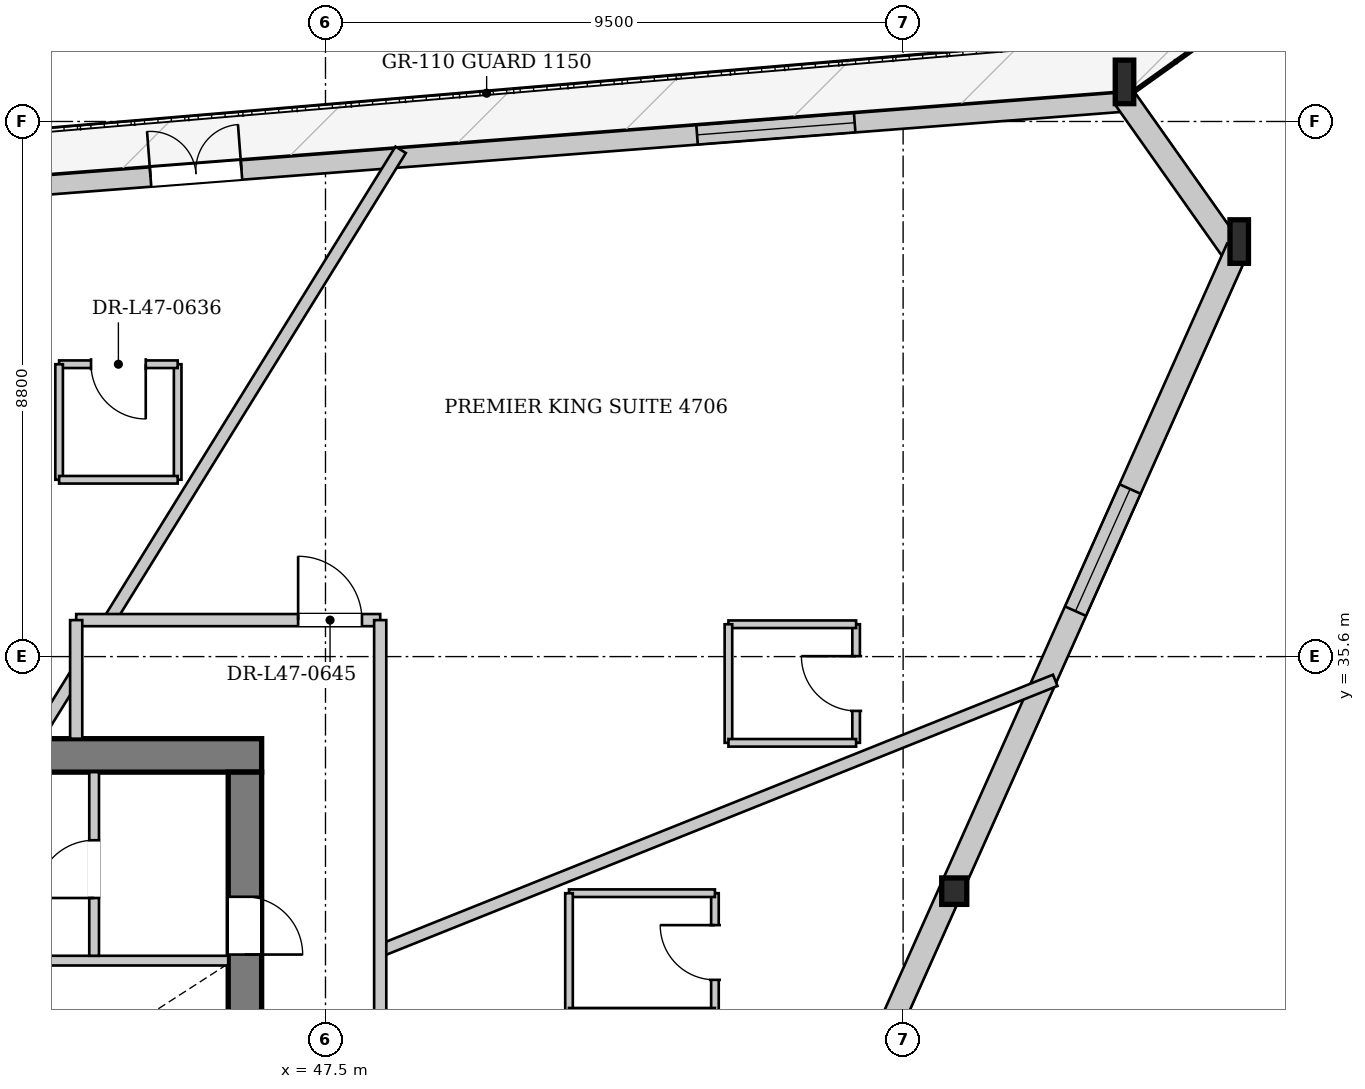
"""IFC4 building model, lengths in metres.
Left out: names, types, materials, properties, quantities, classifications, styles, units other than length and angle.
Written with IfcOpenShell. Run it as: python <this file> out.ifc"""

import sys

from ifc_helpers import new_model, si_unit, direction, frame, frame_2d, origin, origin_2d, place, context, subcontext, project, spatial, rectangle, i_section, extrude, source, transform, mapped, element, fill, save


model = new_model("IFC4")
c1 = context("Model", 3, precision=1e-05, world=origin(), true_north=direction((0.0, 1.0)))
c2 = subcontext(c1, "Body", "Model", "MODEL_VIEW")
j1 = project(units=[si_unit("LENGTHUNIT", "METRE"), si_unit("PLANEANGLEUNIT", "RADIAN")], contexts=[c1])
p1 = place(None, origin())
s1 = spatial("IfcSite", under=j1, at=p1, CompositionType="ELEMENT")
p2 = place(p1, origin())
s2 = spatial("IfcBuilding", under=s1, at=p2, CompositionType="ELEMENT")
p3 = place(p2, frame((0.0, 0.0, 178.55)))
s3 = spatial("IfcBuildingStorey", under=s2, at=p3, CompositionType="ELEMENT", Elevation=178.55)
m1 = source(origin(), c2, "Body", "SweptSolid", [
    extrude(i_section(OverallWidth=0.304, OverallDepth=0.716, WebThickness=0.021, FlangeThickness=0.04, at=origin_2d()), origin(), (0.0, 0.0, 1.0), 3.418),
])
p4 = place(p3, frame((62.675, 42.238, 0.0), z_axis=(-0.086416341516, 0.109555923872, 0.990217004229), x_axis=(-0.785144723535, -0.61931233082, 0.0)))
e1 = element("IfcColumn", 1, at=p4, inside=s3, PredefinedType="COLUMN", context=c2, shape_type="MappedRepresentation", body=[
    mapped(m1, transform((0.0, 0.0, 0.0), x_axis=(1.0, 0.0, 0.0), y_axis=(0.0, 1.0, 0.0), z_axis=(0.0, 0.0, 1.0), scale=1.0)),
])
m2 = source(origin(), c2, "Body", "SweptSolid", [
    extrude(i_section(OverallWidth=0.304, OverallDepth=0.716, WebThickness=0.021, FlangeThickness=0.04, at=origin_2d()), origin(), (0.0, 0.0, 1.0), 3.414),
])
p5 = place(p3, frame((60.798, 44.894, 0.0), z_axis=(-0.09210556719, 0.091962546123, 0.991493547434), x_axis=(-0.706557145383, -0.707655990088, 0.0)))
e2 = element("IfcColumn", 2, at=p5, inside=s3, PredefinedType="COLUMN", context=c2, shape_type="MappedRepresentation", body=[
    mapped(m2, transform((0.0, 0.0, 0.0), x_axis=(1.0, 0.0, 0.0), y_axis=(0.0, 1.0, 0.0), z_axis=(0.0, 0.0, 1.0), scale=1.0)),
])
m3 = source(origin(), c2, "Body", "SweptSolid", [
    extrude(i_section(OverallWidth=0.412, OverallDepth=0.435, WebThickness=0.031, FlangeThickness=0.05, at=origin_2d()), origin(), (0.0, 0.0, 1.0), 3.404),
])
p6 = place(p3, frame((57.912, 31.58, 0.0), z_axis=(-0.042034391169, 0.095402287123, 0.994550910497), x_axis=(-0.915112004841, -0.403199725441, 0.0)))
e3 = element("IfcColumn", 3, at=p6, inside=s3, PredefinedType="COLUMN", context=c2, shape_type="MappedRepresentation", body=[
    mapped(m3, transform((0.0, 0.0, 0.0), x_axis=(1.0, 0.0, 0.0), y_axis=(0.0, 1.0, 0.0), z_axis=(0.0, 0.0, 1.0), scale=1.0)),
])
p7 = place(p3, frame((38.104, 42.985, 0.0), z_axis=(0.0, 0.0, 1.0), x_axis=(0.997043186839, 0.076843240291, 0.0)))
e4 = element("IfcWall", 4, at=p7, inside=s3, PredefinedType="SOLIDWALL", context=c2, shape_type="SweptSolid", body=[
    extrude(rectangle(XDim=22.774, YDim=0.32, at=frame_2d((11.387, 0.0))), origin(), (0.0, 0.0, 1.0), 2.722),
])
p8 = place(p7, frame((6.538, 0.0, 0.0)))
e5 = element("IfcOpeningElement", 5, at=p8, cuts=e4, PredefinedType="OPENING", context=c2, shape_type="SweptSolid", body=[
    extrude(rectangle(XDim=1.5, YDim=2.3, at=frame_2d((0.75, 1.15))), frame((0.0, 0.17, 0.0), z_axis=(0.0, -1.0, 0.0), x_axis=(1.0, 0.0, 0.0)), (0.0, 0.0, 1.0), 0.34),
])
p9 = place(p7, frame((15.553, 0.0, 0.252)))
e6 = element("IfcOpeningElement", 6, at=p9, cuts=e4, PredefinedType="OPENING", context=c2, shape_type="SweptSolid", body=[
    extrude(rectangle(XDim=2.6, YDim=2.35, at=frame_2d((1.3, 1.175))), frame((0.0, 0.17, 0.0), z_axis=(0.0, -1.0, 0.0), x_axis=(1.0, 0.0, 0.0)), (0.0, 0.0, 1.0), 0.34),
])
p10 = place(p3, frame((60.643, 44.784, 0.0), z_axis=(0.0, 0.0, 1.0), x_axis=(0.577204748186, -0.816599460367, 0.0)))
e7 = element("IfcWall", 7, at=p10, inside=s3, PredefinedType="SOLIDWALL", context=c2, shape_type="SweptSolid", body=[
    extrude(rectangle(XDim=3.252, YDim=0.38, at=frame_2d((1.626, 0.0))), origin(), (0.0, 0.0, 1.0), 2.722),
])
p11 = place(p3, frame((62.502, 42.315, 0.0), z_axis=(0.0, 0.0, 1.0), x_axis=(-0.408010166112, -0.912977384358, 0.0)))
e8 = element("IfcWall", 8, at=p11, inside=s3, PredefinedType="SOLIDWALL", context=c2, shape_type="SweptSolid", body=[
    extrude(rectangle(XDim=23.347, YDim=0.38, at=frame_2d((11.674, 0.0))), origin(), (0.0, 0.0, 1.0), 2.722),
])
p12 = place(p11, frame((4.337, 0.0, 0.352)))
e9 = element("IfcOpeningElement", 9, at=p12, cuts=e8, PredefinedType="OPENING", context=c2, shape_type="SweptSolid", body=[
    extrude(rectangle(XDim=2.2, YDim=2.25, at=frame_2d((1.1, 1.125))), frame((0.0, 0.2, 0.0), z_axis=(0.0, -1.0, 0.0), x_axis=(1.0, 0.0, 0.0)), (0.0, 0.0, 1.0), 0.4),
])
p13 = place(p11, frame((15.71, 0.0, 0.352)))
e10 = element("IfcOpeningElement", 10, at=p13, cuts=e8, PredefinedType="OPENING", context=c2, shape_type="SweptSolid", body=[
    extrude(rectangle(XDim=2.2, YDim=2.25, at=frame_2d((1.1, 1.125))), frame((0.0, 0.2, 0.0), z_axis=(0.0, -1.0, 0.0), x_axis=(1.0, 0.0, 0.0)), (0.0, 0.0, 1.0), 0.4),
])
p14 = place(p3, frame((29.55, 33.975, 0.0), z_axis=(0.0, 0.0, 1.0), x_axis=(1.0, 0.0, 0.0)))
e11 = element("IfcWall", 11, at=p14, inside=s3, PredefinedType="SHEAR", context=c2, shape_type="SweptSolid", body=[
    extrude(rectangle(XDim=16.9, YDim=0.55, at=frame_2d((8.45, 0.0))), origin(), (0.0, 0.0, 1.0), 3.33),
])
p15 = place(p14, frame((1.55, 0.0, 0.0)))
e12 = element("IfcOpeningElement", 12, at=p15, cuts=e11, PredefinedType="OPENING", context=c2, shape_type="SweptSolid", body=[
    extrude(rectangle(XDim=0.95, YDim=2.1, at=frame_2d((0.475, 1.05))), frame((0.0, 0.285, 0.0), z_axis=(0.0, -1.0, 0.0), x_axis=(1.0, 0.0, 0.0)), (0.0, 0.0, 1.0), 0.57),
])
p16 = place(p14, frame((3.93, 0.0, 0.0)))
e13 = element("IfcOpeningElement", 13, at=p16, cuts=e11, PredefinedType="OPENING", context=c2, shape_type="SweptSolid", body=[
    extrude(rectangle(XDim=1.32, YDim=2.2, at=frame_2d((0.66, 1.1))), frame((0.0, 0.285, 0.0), z_axis=(0.0, -1.0, 0.0), x_axis=(1.0, 0.0, 0.0)), (0.0, 0.0, 1.0), 0.57),
])
p17 = place(p3, frame((46.175, 33.7, 0.0), z_axis=(0.0, 0.0, 1.0), x_axis=(0.0, -1.0, 0.0)))
e14 = element("IfcWall", 14, at=p17, inside=s3, PredefinedType="SHEAR", context=c2, shape_type="SweptSolid", body=[
    extrude(rectangle(XDim=14.2, YDim=0.55, at=frame_2d((7.1, 0.0))), origin(), (0.0, 0.0, 1.0), 3.33),
])
p18 = place(p17, frame((5.18, 0.0, 0.0)))
e15 = element("IfcOpeningElement", 15, at=p18, cuts=e14, PredefinedType="OPENING", context=c2, shape_type="SweptSolid", body=[
    extrude(rectangle(XDim=1.6, YDim=2.2, at=frame_2d((0.8, 1.1))), frame((0.0, 0.285, 0.0), z_axis=(0.0, -1.0, 0.0), x_axis=(1.0, 0.0, 0.0)), (0.0, 0.0, 1.0), 0.57),
])
p19 = place(p17, frame((2.05, 0.0, 0.0)))
e16 = element("IfcOpeningElement", 16, at=p19, cuts=e14, PredefinedType="OPENING", context=c2, shape_type="SweptSolid", body=[
    extrude(rectangle(XDim=0.95, YDim=2.1, at=frame_2d((0.475, 1.05))), frame((0.0, 0.285, 0.0), z_axis=(0.0, -1.0, 0.0), x_axis=(1.0, 0.0, 0.0)), (0.0, 0.0, 1.0), 0.57),
])
p20 = place(p3, frame((40.72, 30.6, 0.0), z_axis=(0.0, 0.0, 1.0), x_axis=(1.0, 0.0, 0.0)))
e17 = element("IfcWall", 17, at=p20, inside=s3, PredefinedType="PARTITIONING", context=c2, shape_type="SweptSolid", body=[
    extrude(rectangle(XDim=5.18, YDim=0.16, at=frame_2d((2.59, 0.0))), origin(), (0.0, 0.0, 1.0), 3.33),
])
p21 = place(p3, frame((43.695, 30.68, 0.0), z_axis=(0.0, 0.0, 1.0), x_axis=(0.0, 1.0, 0.0)))
e18 = element("IfcWall", 18, at=p21, inside=s3, PredefinedType="PARTITIONING", context=c2, shape_type="SweptSolid", body=[
    extrude(rectangle(XDim=3.02, YDim=0.16, at=frame_2d((1.51, 0.0))), origin(), (0.0, 0.0, 1.0), 3.33),
])
p22 = place(p21, frame((0.95, 0.0, 0.0)))
e19 = element("IfcOpeningElement", 19, at=p22, cuts=e18, PredefinedType="OPENING", context=c2, shape_type="SweptSolid", body=[
    extrude(rectangle(XDim=0.95, YDim=2.1, at=frame_2d((0.475, 1.05))), frame((0.0, 0.09, 0.0), z_axis=(0.0, -1.0, 0.0), x_axis=(1.0, 0.0, 0.0)), (0.0, 0.0, 1.0), 0.18),
])
p23 = place(p3, frame((48.4, 30.764, 0.0), z_axis=(0.0, 0.0, 1.0), x_axis=(0.928341463562, 0.371728566338, 0.0)))
e20 = element("IfcWall", 20, at=p23, inside=s3, PredefinedType="PARTITIONING", context=c2, shape_type="SweptSolid", body=[
    extrude(rectangle(XDim=11.958, YDim=0.2, at=frame_2d((5.979, 0.0))), origin(), (0.0, 0.0, 1.0), 3.33),
])
p24 = place(p3, frame((42.738, 34.25, 0.0), z_axis=(0.0, 0.0, 1.0), x_axis=(0.526414798645, 0.850227886962, 0.0)))
e21 = element("IfcWall", 21, at=p24, inside=s3, PredefinedType="PARTITIONING", context=c2, shape_type="SweptSolid", body=[
    extrude(rectangle(XDim=1.257, YDim=0.2, at=frame_2d((0.628, 0.0))), origin(), (0.0, 0.0, 1.0), 3.33),
])
p25 = place(p3, frame((43.946, 36.2, 0.0), z_axis=(0.0, 0.0, 1.0), x_axis=(0.526559690384, 0.850138160808, 0.0)))
e22 = element("IfcWall", 22, at=p25, inside=s3, PredefinedType="PARTITIONING", context=c2, shape_type="SweptSolid", body=[
    extrude(rectangle(XDim=9.098, YDim=0.2, at=frame_2d((4.549, 0.0))), origin(), (0.0, 0.0, 1.0), 3.33),
])
p26 = place(p3, frame((53.905, 29.759, 0.0), z_axis=(0.0, 0.0, 1.0), x_axis=(0.0, 1.0, 0.0)))
e23 = element("IfcWall", 23, at=p26, inside=s3, PredefinedType="PARTITIONING", context=c2, shape_type="SweptSolid", body=[
    extrude(rectangle(XDim=1.95, YDim=0.125, at=frame_2d((0.975, 0.0))), origin(), (0.0, 0.0, 1.0), 3.33),
])
p27 = place(p26, frame((0.525, 0.0, 0.0)))
e24 = element("IfcOpeningElement", 24, at=p27, cuts=e23, PredefinedType="OPENING", context=c2, shape_type="SweptSolid", body=[
    extrude(rectangle(XDim=0.9, YDim=2.1, at=frame_2d((0.45, 1.05))), frame((0.0, 0.073, 0.0), z_axis=(0.0, -1.0, 0.0), x_axis=(1.0, 0.0, 0.0)), (0.0, 0.0, 1.0), 0.145),
])
p28 = place(p3, frame((53.905, 31.709, 0.0), z_axis=(0.0, 0.0, 1.0), x_axis=(-1.0, 0.0, 0.0)))
e25 = element("IfcWall", 25, at=p28, inside=s3, PredefinedType="PARTITIONING", context=c2, shape_type="SweptSolid", body=[
    extrude(rectangle(XDim=2.4, YDim=0.125, at=frame_2d((1.2, 0.0))), origin(), (0.0, 0.0, 1.0), 3.33),
])
p29 = place(p3, frame((51.505, 31.709, 0.0), z_axis=(0.0, 0.0, 1.0), x_axis=(0.0, -1.0, 0.0)))
e26 = element("IfcWall", 26, at=p29, inside=s3, PredefinedType="PARTITIONING", context=c2, shape_type="SweptSolid", body=[
    extrude(rectangle(XDim=1.95, YDim=0.125, at=frame_2d((0.975, 0.0))), origin(), (0.0, 0.0, 1.0), 3.33),
])
p30 = place(p3, frame((51.505, 29.759, 0.0), z_axis=(0.0, 0.0, 1.0), x_axis=(1.0, 0.0, 0.0)))
e27 = element("IfcWall", 27, at=p30, inside=s3, PredefinedType="PARTITIONING", context=c2, shape_type="SweptSolid", body=[
    extrude(rectangle(XDim=2.4, YDim=0.125, at=frame_2d((1.2, 0.0))), origin(), (0.0, 0.0, 1.0), 3.33),
])
p31 = place(p3, frame((56.227, 34.182, 0.0), z_axis=(0.0, 0.0, 1.0), x_axis=(0.0, 1.0, 0.0)))
e28 = element("IfcWall", 28, at=p31, inside=s3, PredefinedType="PARTITIONING", context=c2, shape_type="SweptSolid", body=[
    extrude(rectangle(XDim=1.95, YDim=0.125, at=frame_2d((0.975, 0.0))), origin(), (0.0, 0.0, 1.0), 3.33),
])
p32 = place(p31, frame((0.525, 0.0, 0.0)))
e29 = element("IfcOpeningElement", 29, at=p32, cuts=e28, PredefinedType="OPENING", context=c2, shape_type="SweptSolid", body=[
    extrude(rectangle(XDim=0.9, YDim=2.1, at=frame_2d((0.45, 1.05))), frame((0.0, 0.073, 0.0), z_axis=(0.0, -1.0, 0.0), x_axis=(1.0, 0.0, 0.0)), (0.0, 0.0, 1.0), 0.145),
])
p33 = place(p3, frame((56.227, 36.132, 0.0), z_axis=(0.0, 0.0, 1.0), x_axis=(-1.0, 0.0, 0.0)))
e30 = element("IfcWall", 30, at=p33, inside=s3, PredefinedType="PARTITIONING", context=c2, shape_type="SweptSolid", body=[
    extrude(rectangle(XDim=2.1, YDim=0.125, at=frame_2d((1.05, 0.0))), origin(), (0.0, 0.0, 1.0), 3.33),
])
p34 = place(p3, frame((54.127, 36.132, 0.0), z_axis=(0.0, 0.0, 1.0), x_axis=(0.0, -1.0, 0.0)))
e31 = element("IfcWall", 31, at=p34, inside=s3, PredefinedType="PARTITIONING", context=c2, shape_type="SweptSolid", body=[
    extrude(rectangle(XDim=1.95, YDim=0.125, at=frame_2d((0.975, 0.0))), origin(), (0.0, 0.0, 1.0), 3.33),
])
p35 = place(p3, frame((54.127, 34.182, 0.0), z_axis=(0.0, 0.0, 1.0), x_axis=(1.0, 0.0, 0.0)))
e32 = element("IfcWall", 32, at=p35, inside=s3, PredefinedType="PARTITIONING", context=c2, shape_type="SweptSolid", body=[
    extrude(rectangle(XDim=2.1, YDim=0.125, at=frame_2d((1.05, 0.0))), origin(), (0.0, 0.0, 1.0), 3.33),
])
p36 = place(p3, frame((45.069, 38.508, 0.0), z_axis=(0.0, 0.0, 1.0), x_axis=(0.0, 1.0, 0.0)))
e33 = element("IfcWall", 33, at=p36, inside=s3, PredefinedType="PARTITIONING", context=c2, shape_type="SweptSolid", body=[
    extrude(rectangle(XDim=1.9, YDim=0.125, at=frame_2d((0.95, 0.0))), origin(), (0.0, 0.0, 1.0), 3.33),
])
p37 = place(p3, frame((45.069, 40.408, 0.0), z_axis=(0.0, 0.0, 1.0), x_axis=(-1.0, 0.0, 0.0)))
e34 = element("IfcWall", 34, at=p37, inside=s3, PredefinedType="PARTITIONING", context=c2, shape_type="SweptSolid", body=[
    extrude(rectangle(XDim=1.95, YDim=0.125, at=frame_2d((0.975, 0.0))), origin(), (0.0, 0.0, 1.0), 3.33),
])
p38 = place(p37, frame((0.525, 0.0, 0.0)))
e35 = element("IfcOpeningElement", 35, at=p38, cuts=e34, PredefinedType="OPENING", context=c2, shape_type="SweptSolid", body=[
    extrude(rectangle(XDim=0.9, YDim=2.1, at=frame_2d((0.45, 1.05))), frame((0.0, 0.073, 0.0), z_axis=(0.0, -1.0, 0.0), x_axis=(1.0, 0.0, 0.0)), (0.0, 0.0, 1.0), 0.145),
])
p39 = place(p3, frame((43.119, 40.408, 0.0), z_axis=(0.0, 0.0, 1.0), x_axis=(0.0, -1.0, 0.0)))
e36 = element("IfcWall", 36, at=p39, inside=s3, PredefinedType="PARTITIONING", context=c2, shape_type="SweptSolid", body=[
    extrude(rectangle(XDim=1.9, YDim=0.125, at=frame_2d((0.95, 0.0))), origin(), (0.0, 0.0, 1.0), 3.33),
])
p40 = place(p3, frame((43.119, 38.508, 0.0), z_axis=(0.0, 0.0, 1.0), x_axis=(1.0, 0.0, 0.0)))
e37 = element("IfcWall", 37, at=p40, inside=s3, PredefinedType="PARTITIONING", context=c2, shape_type="SweptSolid", body=[
    extrude(rectangle(XDim=1.95, YDim=0.125, at=frame_2d((0.975, 0.0))), origin(), (0.0, 0.0, 1.0), 3.33),
])
p41 = place(p3, frame((43.4, 36.2, 0.0), z_axis=(0.0, 0.0, 1.0), x_axis=(1.0, 0.0, 0.0)))
e38 = element("IfcWall", 38, at=p41, inside=s3, PredefinedType="PARTITIONING", context=c2, shape_type="SweptSolid", body=[
    extrude(rectangle(XDim=5.0, YDim=0.2, at=frame_2d((2.5, 0.0))), origin(), (0.0, 0.0, 1.0), 3.33),
])
p42 = place(p41, frame((3.65, 0.0, 0.0)))
e39 = element("IfcOpeningElement", 39, at=p42, cuts=e38, PredefinedType="OPENING", context=c2, shape_type="SweptSolid", body=[
    extrude(rectangle(XDim=1.05, YDim=2.2, at=frame_2d((0.525, 1.1))), frame((0.0, 0.11, 0.0), z_axis=(0.0, -1.0, 0.0), x_axis=(1.0, 0.0, 0.0)), (0.0, 0.0, 1.0), 0.22),
])
p43 = place(p3, frame((43.4, 34.25, 0.0), z_axis=(0.0, 0.0, 1.0), x_axis=(0.0, 1.0, 0.0)))
e40 = element("IfcWall", 40, at=p43, inside=s3, PredefinedType="PARTITIONING", context=c2, shape_type="SweptSolid", body=[
    extrude(rectangle(XDim=1.95, YDim=0.2, at=frame_2d((0.975, 0.0))), origin(), (0.0, 0.0, 1.0), 3.33),
])
p44 = place(p3, frame((48.4, 17.0, 0.0), z_axis=(0.0, 0.0, 1.0), x_axis=(0.0, 1.0, 0.0)))
e41 = element("IfcWall", 41, at=p44, inside=s3, PredefinedType="PARTITIONING", context=c2, shape_type="SweptSolid", body=[
    extrude(rectangle(XDim=19.2, YDim=0.2, at=frame_2d((9.6, 0.0))), origin(), (0.0, 0.0, 1.0), 3.33),
])
p45 = place(p44, frame((9.249, 0.0, 0.0)))
e42 = element("IfcOpeningElement", 42, at=p45, cuts=e41, PredefinedType="OPENING", context=c2, shape_type="SweptSolid", body=[
    extrude(rectangle(XDim=1.05, YDim=2.2, at=frame_2d((0.525, 1.1))), frame((0.0, 0.11, 0.0), z_axis=(0.0, -1.0, 0.0), x_axis=(1.0, 0.0, 0.0)), (0.0, 0.0, 1.0), 0.22),
])
m4 = source(origin(), c2, "Body", "SweptSolid", [
    extrude(rectangle(XDim=1.5, YDim=2.3, at=frame_2d((0.75, 1.15))), frame((0.0, 0.025, 0.0), z_axis=(0.0, -1.0, 0.0), x_axis=(1.0, 0.0, 0.0)), (0.0, 0.0, 1.0), 0.05),
])
p46 = place(p8, origin())
e43 = element("IfcDoor", 43, at=p46, inside=s3, OperationType="DOUBLE_DOOR_SINGLE_SWING", PredefinedType="DOOR", context=c2, shape_type="MappedRepresentation", body=[
    mapped(m4, transform((0.0, 0.0, 0.0), x_axis=(1.0, 0.0, 0.0), y_axis=(0.0, 1.0, 0.0), z_axis=(0.0, 0.0, 1.0), scale=1.0)),
])
fill(e5, e43)
m5 = source(origin(), c2, "Body", "SweptSolid", [
    extrude(rectangle(XDim=2.6, YDim=2.35, at=frame_2d((1.3, 1.175))), frame((0.0, 0.03, 0.0), z_axis=(0.0, -1.0, 0.0), x_axis=(1.0, 0.0, 0.0)), (0.0, 0.0, 1.0), 0.06),
])
p47 = place(p9, origin())
e44 = element("IfcWindow", 44, at=p47, inside=s3, PartitioningType="SINGLE_PANEL", PredefinedType="WINDOW", context=c2, shape_type="MappedRepresentation", body=[
    mapped(m5, transform((0.0, 0.0, 0.0), x_axis=(1.0, 0.0, 0.0), y_axis=(0.0, 1.0, 0.0), z_axis=(0.0, 0.0, 1.0), scale=1.0)),
])
fill(e6, e44)
m6 = source(origin(), c2, "Body", "SweptSolid", [
    extrude(rectangle(XDim=2.2, YDim=2.25, at=frame_2d((1.1, 1.125))), frame((0.0, 0.03, 0.0), z_axis=(0.0, -1.0, 0.0), x_axis=(1.0, 0.0, 0.0)), (0.0, 0.0, 1.0), 0.06),
])
p48 = place(p12, origin())
e45 = element("IfcWindow", 45, at=p48, inside=s3, PartitioningType="SINGLE_PANEL", PredefinedType="WINDOW", context=c2, shape_type="MappedRepresentation", body=[
    mapped(m6, transform((0.0, 0.0, 0.0), x_axis=(1.0, 0.0, 0.0), y_axis=(0.0, 1.0, 0.0), z_axis=(0.0, 0.0, 1.0), scale=1.0)),
])
fill(e9, e45)
m7 = source(origin(), c2, "Body", "SweptSolid", [
    extrude(rectangle(XDim=0.95, YDim=2.1, at=frame_2d((0.475, 1.05))), frame((0.0, 0.025, 0.0), z_axis=(0.0, -1.0, 0.0), x_axis=(1.0, 0.0, 0.0)), (0.0, 0.0, 1.0), 0.05),
])
p49 = place(p22, origin())
e46 = element("IfcDoor", 46, at=p49, inside=s3, OperationType="SINGLE_SWING_LEFT", PredefinedType="DOOR", context=c2, shape_type="MappedRepresentation", body=[
    mapped(m7, transform((0.0, 0.0, 0.0), x_axis=(1.0, 0.0, 0.0), y_axis=(0.0, 1.0, 0.0), z_axis=(0.0, 0.0, 1.0), scale=1.0)),
])
fill(e19, e46)
p50 = place(p19, origin())
e47 = element("IfcDoor", 47, at=p50, inside=s3, OperationType="SINGLE_SWING_RIGHT", PredefinedType="DOOR", context=c2, shape_type="MappedRepresentation", body=[
    mapped(m7, transform((0.0, 0.0, 0.0), x_axis=(1.0, 0.0, 0.0), y_axis=(0.0, 1.0, 0.0), z_axis=(0.0, 0.0, 1.0), scale=1.0)),
])
fill(e16, e47)
m8 = source(origin(), c2, "Body", "SweptSolid", [
    extrude(rectangle(XDim=0.9, YDim=2.1, at=frame_2d((0.45, 1.05))), frame((0.0, 0.025, 0.0), z_axis=(0.0, -1.0, 0.0), x_axis=(1.0, 0.0, 0.0)), (0.0, 0.0, 1.0), 0.05),
])
p51 = place(p27, origin())
e48 = element("IfcDoor", 48, at=p51, inside=s3, OperationType="SINGLE_SWING_RIGHT", PredefinedType="DOOR", context=c2, shape_type="MappedRepresentation", body=[
    mapped(m8, transform((0.0, 0.0, 0.0), x_axis=(1.0, 0.0, 0.0), y_axis=(0.0, 1.0, 0.0), z_axis=(0.0, 0.0, 1.0), scale=1.0)),
])
fill(e24, e48)
p52 = place(p32, origin())
e49 = element("IfcDoor", 49, at=p52, inside=s3, OperationType="SINGLE_SWING_RIGHT", PredefinedType="DOOR", context=c2, shape_type="MappedRepresentation", body=[
    mapped(m8, transform((0.0, 0.0, 0.0), x_axis=(1.0, 0.0, 0.0), y_axis=(0.0, 1.0, 0.0), z_axis=(0.0, 0.0, 1.0), scale=1.0)),
])
fill(e29, e49)
p53 = place(p38, origin())
e50 = element("IfcDoor", 50, at=p53, inside=s3, OperationType="SINGLE_SWING_LEFT", PredefinedType="DOOR", context=c2, shape_type="MappedRepresentation", body=[
    mapped(m8, transform((0.0, 0.0, 0.0), x_axis=(1.0, 0.0, 0.0), y_axis=(0.0, 1.0, 0.0), z_axis=(0.0, 0.0, 1.0), scale=1.0)),
])
fill(e35, e50)
m9 = source(origin(), c2, "Body", "SweptSolid", [
    extrude(rectangle(XDim=1.05, YDim=2.2, at=frame_2d((0.525, 1.1))), frame((0.0, 0.025, 0.0), z_axis=(0.0, -1.0, 0.0), x_axis=(1.0, 0.0, 0.0)), (0.0, 0.0, 1.0), 0.05),
])
p54 = place(p42, origin())
e51 = element("IfcDoor", 51, at=p54, inside=s3, OperationType="SINGLE_SWING_LEFT", PredefinedType="DOOR", context=c2, shape_type="MappedRepresentation", body=[
    mapped(m9, transform((0.0, 0.0, 0.0), x_axis=(1.0, 0.0, 0.0), y_axis=(0.0, 1.0, 0.0), z_axis=(0.0, 0.0, 1.0), scale=1.0)),
])
fill(e39, e51)
save(model, sys.argv[1])
